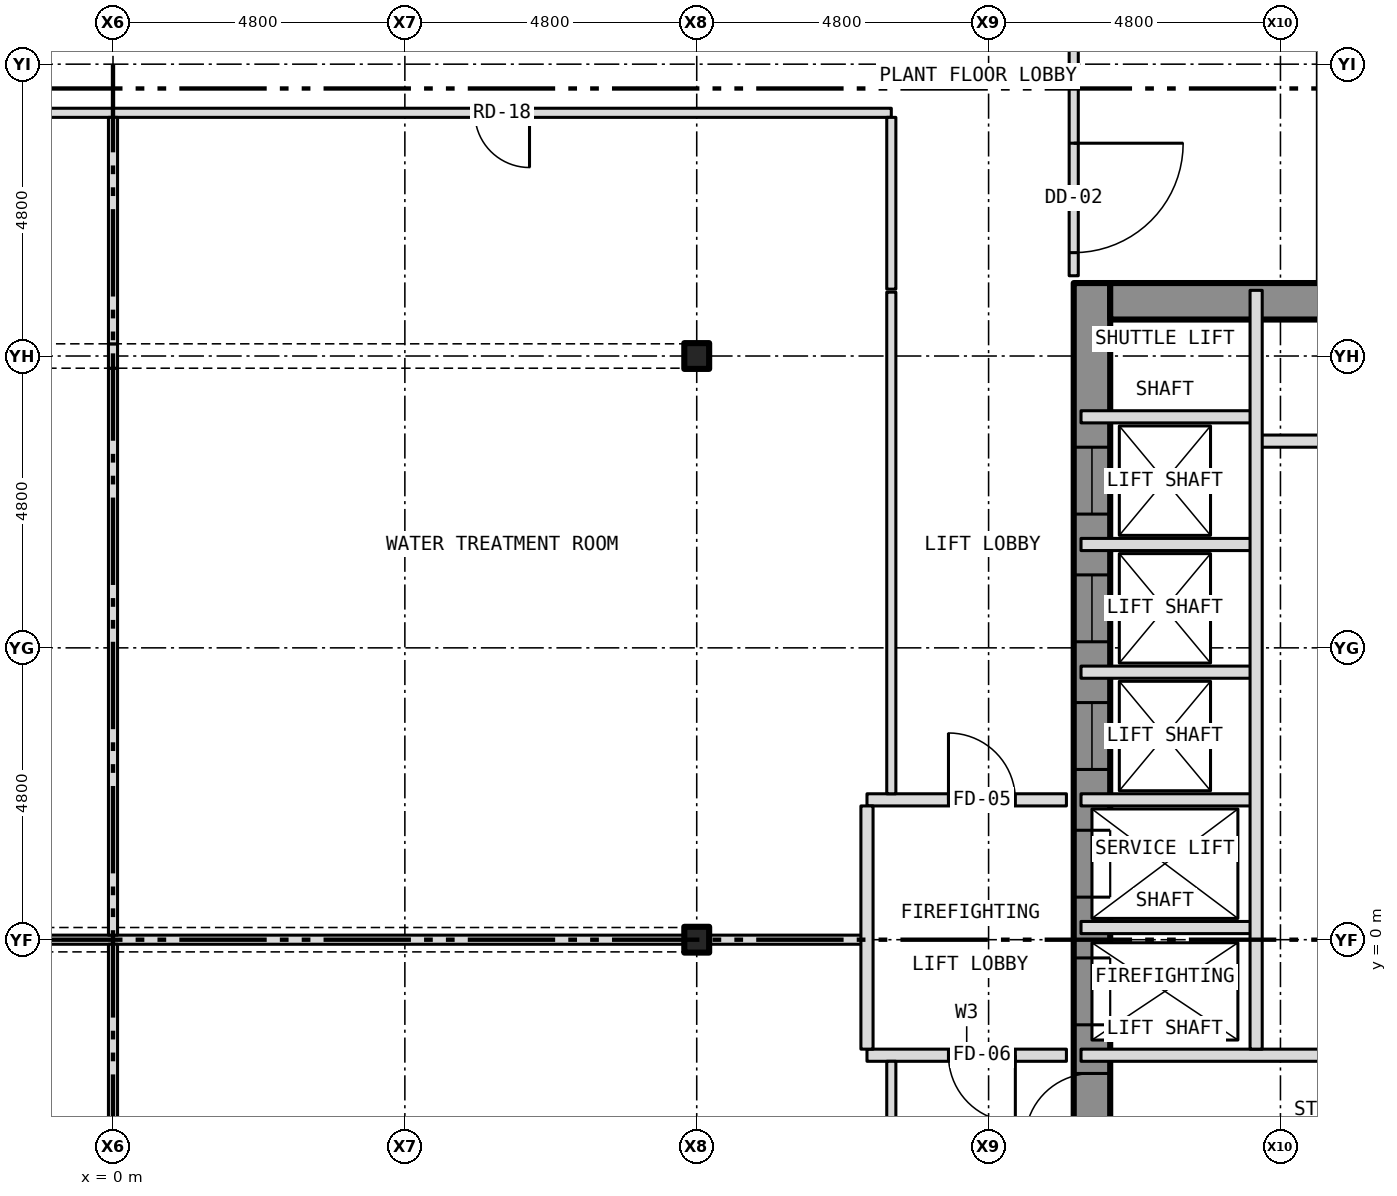
"""IFC4 building model, lengths in metres.
Left out: names, types, materials, properties, quantities, classifications, styles, units other than length and angle.
Written with IfcOpenShell. Run it as: python <this file> out.ifc"""

import sys

from ifc_helpers import new_model, si_unit, direction, frame, frame_2d, origin, origin_2d, place, context, subcontext, project, spatial, rectangle, i_section, extrude, element, fill, save


model = new_model("IFC4")
c1 = context("Model", 3, precision=1e-05, world=origin(), true_north=direction((0.0, 1.0)))
c2 = subcontext(c1, "Body", "Model", "MODEL_VIEW")
j1 = project(units=[si_unit("LENGTHUNIT", "METRE"), si_unit("PLANEANGLEUNIT", "RADIAN")], contexts=[c1])
p1 = place(None, origin())
s1 = spatial("IfcSite", under=j1, at=p1, CompositionType="ELEMENT")
p2 = place(p1, origin())
s2 = spatial("IfcBuilding", under=s1, at=p2, CompositionType="ELEMENT")
p3 = place(p2, frame((0.0, 0.0, 84.5)))
s3 = spatial("IfcBuildingStorey", under=s2, at=p3, CompositionType="ELEMENT", Elevation=84.5)
for number, where, z_axis, x_axis in (
    (1, (9.6, 0.0, -0.3), (0.0, 0.0, 1.0), (1.0, 0.0, 0.0)),
    (2, (9.6, 9.6, -0.3), (0.0, 0.0, 1.0), (1.0, 0.0, 0.0)),
):
    element("IfcColumn", number, at=place(p3, frame(where, z_axis=z_axis, x_axis=x_axis)), inside=s3, PredefinedType="COLUMN", context=c2, shape_type="SweptSolid", body=[
        extrude(i_section(OverallWidth=0.409, OverallDepth=0.424, WebThickness=0.033, FlangeThickness=0.052, at=origin_2d()), origin(), (0.0, 0.0, 1.0), 4.65),
    ])
p4 = place(p3, frame((16.1, -10.8, 0.0), z_axis=(0.0, 0.0, 1.0), x_axis=(0.0, 1.0, 0.0)))
e3 = element("IfcWall", 3, at=p4, inside=s3, PredefinedType="SHEAR", context=c2, shape_type="SweptSolid", body=[
    extrude(rectangle(XDim=21.6, YDim=0.6, at=frame_2d((10.8, 0.0))), origin(), (0.0, 0.0, 1.0), 3.9),
])
p5 = place(p4, frame((9.4, 0.0, 0.0)))
e4 = element("IfcOpeningElement", 4, at=p5, cuts=e3, PredefinedType="OPENING", context=c2, shape_type="SweptSolid", body=[
    extrude(rectangle(XDim=1.1, YDim=2.1, at=frame_2d((0.55, 1.05))), frame((0.0, 0.312, 0.0), z_axis=(0.0, -1.0, 0.0), x_axis=(1.0, 0.0, 0.0)), (0.0, 0.0, 1.0), 0.624),
])
p6 = place(p4, frame((11.5, 0.0, 0.0)))
e5 = element("IfcOpeningElement", 5, at=p6, cuts=e3, PredefinedType="OPENING", context=c2, shape_type="SweptSolid", body=[
    extrude(rectangle(XDim=1.1, YDim=2.1, at=frame_2d((0.55, 1.05))), frame((0.0, 0.312, 0.0), z_axis=(0.0, -1.0, 0.0), x_axis=(1.0, 0.0, 0.0)), (0.0, 0.0, 1.0), 0.624),
])
p7 = place(p4, frame((13.6, 0.0, 0.0)))
e6 = element("IfcOpeningElement", 6, at=p7, cuts=e3, PredefinedType="OPENING", context=c2, shape_type="SweptSolid", body=[
    extrude(rectangle(XDim=1.1, YDim=2.1, at=frame_2d((0.55, 1.05))), frame((0.0, 0.312, 0.0), z_axis=(0.0, -1.0, 0.0), x_axis=(1.0, 0.0, 0.0)), (0.0, 0.0, 1.0), 0.624),
])
p8 = place(p4, frame((15.7, 0.0, 0.0)))
e7 = element("IfcOpeningElement", 7, at=p8, cuts=e3, PredefinedType="OPENING", context=c2, shape_type="SweptSolid", body=[
    extrude(rectangle(XDim=1.1, YDim=2.1, at=frame_2d((0.55, 1.05))), frame((0.0, 0.312, 0.0), z_axis=(0.0, -1.0, 0.0), x_axis=(1.0, 0.0, 0.0)), (0.0, 0.0, 1.0), 0.624),
])
p9 = place(p4, frame((17.8, 0.0, 0.0)))
e8 = element("IfcOpeningElement", 8, at=p9, cuts=e3, PredefinedType="OPENING", context=c2, shape_type="SweptSolid", body=[
    extrude(rectangle(XDim=1.1, YDim=2.1, at=frame_2d((0.55, 1.05))), frame((0.0, 0.312, 0.0), z_axis=(0.0, -1.0, 0.0), x_axis=(1.0, 0.0, 0.0)), (0.0, 0.0, 1.0), 0.624),
])
p10 = place(p4, frame((5.642, 0.0, 0.0)))
e9 = element("IfcOpeningElement", 9, at=p10, cuts=e3, PredefinedType="OPENING", context=c2, shape_type="SweptSolid", body=[
    extrude(rectangle(XDim=1.1, YDim=2.1, at=frame_2d((0.55, 1.05))), frame((0.0, 0.312, 0.0), z_axis=(0.0, -1.0, 0.0), x_axis=(1.0, 0.0, 0.0)), (0.0, 0.0, 1.0), 0.624),
])
p11 = place(p4, frame((7.5, 0.0, 0.0)))
e10 = element("IfcOpeningElement", 10, at=p11, cuts=e3, PredefinedType="OPENING", context=c2, shape_type="SweptSolid", body=[
    extrude(rectangle(XDim=1.1, YDim=2.1, at=frame_2d((0.55, 1.05))), frame((0.0, 0.312, 0.0), z_axis=(0.0, -1.0, 0.0), x_axis=(1.0, 0.0, 0.0)), (0.0, 0.0, 1.0), 0.624),
])
p12 = place(p3, frame((16.4, 10.5, 0.0), z_axis=(0.0, 0.0, 1.0), x_axis=(1.0, 0.0, 0.0)))
e11 = element("IfcWall", 11, at=p12, inside=s3, PredefinedType="SHEAR", context=c2, shape_type="SweptSolid", body=[
    extrude(rectangle(XDim=7.0, YDim=0.6, at=frame_2d((3.5, 0.0))), origin(), (0.0, 0.0, 1.0), 3.9),
])
p13 = place(p3, frame((12.4, -1.9, 0.0), z_axis=(0.0, 0.0, 1.0), x_axis=(1.0, 0.0, 0.0)))
e12 = element("IfcWall", 12, at=p13, inside=s3, PredefinedType="PARTITIONING", context=c2, shape_type="SweptSolid", body=[
    extrude(rectangle(XDim=3.28, YDim=0.2, at=frame_2d((1.64, 0.0))), origin(), (0.0, 0.0, 1.0), 4.35),
])
p14 = place(p13, frame((1.34, 0.0, 0.0)))
e13 = element("IfcOpeningElement", 13, at=p14, cuts=e12, PredefinedType="OPENING", context=c2, shape_type="SweptSolid", body=[
    extrude(rectangle(XDim=1.1, YDim=2.1, at=frame_2d((0.55, 1.05))), frame((0.0, 0.112, 0.0), z_axis=(0.0, -1.0, 0.0), x_axis=(1.0, 0.0, 0.0)), (0.0, 0.0, 1.0), 0.224),
])
p15 = place(p3, frame((15.92, -1.9, 0.0), z_axis=(0.0, 0.0, 1.0), x_axis=(1.0, 0.0, 0.0)))
e14 = element("IfcWall", 14, at=p15, inside=s3, PredefinedType="PARTITIONING", context=c2, shape_type="SweptSolid", body=[
    extrude(rectangle(XDim=7.96, YDim=0.2, at=frame_2d((3.98, 0.0))), origin(), (0.0, 0.0, 1.0), 3.9),
])
p16 = place(p3, frame((-9.804, 0.0, 0.0), z_axis=(0.0, 0.0, 1.0), x_axis=(1.0, 0.0, 0.0)))
e15 = element("IfcWall", 15, at=p16, inside=s3, PredefinedType="PARTITIONING", context=c2, shape_type="SweptSolid", body=[
    extrude(rectangle(XDim=19.608, YDim=0.15, at=frame_2d((9.804, 0.0))), origin(), (0.0, 0.0, 1.0), 4.35),
])
p17 = place(p3, frame((9.804, 0.0, 0.0), z_axis=(0.0, 0.0, 1.0), x_axis=(1.0, 0.0, 0.0)))
e16 = element("IfcWall", 16, at=p17, inside=s3, PredefinedType="PARTITIONING", context=c2, shape_type="SweptSolid", body=[
    extrude(rectangle(XDim=2.596, YDim=0.15, at=frame_2d((1.298, 0.0))), origin(), (0.0, 0.0, 1.0), 3.728),
])
p18 = place(p3, frame((15.92, 0.2, 0.0), z_axis=(0.0, 0.0, 1.0), x_axis=(1.0, 0.0, 0.0)))
e17 = element("IfcWall", 17, at=p18, inside=s3, PredefinedType="PARTITIONING", context=c2, shape_type="SweptSolid", body=[
    extrude(rectangle(XDim=2.88, YDim=0.2, at=frame_2d((1.44, 0.0))), origin(), (0.0, 0.0, 1.0), 3.9),
])
p19 = place(p3, frame((12.4, 2.3, 0.0), z_axis=(0.0, 0.0, 1.0), x_axis=(1.0, 0.0, 0.0)))
e18 = element("IfcWall", 18, at=p19, inside=s3, PredefinedType="PARTITIONING", context=c2, shape_type="SweptSolid", body=[
    extrude(rectangle(XDim=3.28, YDim=0.2, at=frame_2d((1.64, 0.0))), origin(), (0.0, 0.0, 1.0), 4.35),
])
p20 = place(p19, frame((1.34, 0.0, 0.0)))
e19 = element("IfcOpeningElement", 19, at=p20, cuts=e18, PredefinedType="OPENING", context=c2, shape_type="SweptSolid", body=[
    extrude(rectangle(XDim=1.1, YDim=2.1, at=frame_2d((0.55, 1.05))), frame((0.0, 0.112, 0.0), z_axis=(0.0, -1.0, 0.0), x_axis=(1.0, 0.0, 0.0)), (0.0, 0.0, 1.0), 0.224),
])
for number, where, z_axis, x_axis in (
    (20, (15.92, 2.3, 0.0), (0.0, 0.0, 1.0), (1.0, 0.0, 0.0)),
    (21, (15.92, 4.4, 0.0), (0.0, 0.0, 1.0), (1.0, 0.0, 0.0)),
    (22, (15.92, 6.5, 0.0), (0.0, 0.0, 1.0), (1.0, 0.0, 0.0)),
):
    element("IfcWall", number, at=place(p3, frame(where, z_axis=z_axis, x_axis=x_axis)), inside=s3, PredefinedType="PARTITIONING", context=c2, shape_type="SweptSolid", body=[
        extrude(rectangle(XDim=2.88, YDim=0.2, at=frame_2d((1.44, 0.0))), origin(), (0.0, 0.0, 1.0), 3.9),
    ])
p21 = place(p3, frame((18.8, 8.2, 0.0), z_axis=(0.0, 0.0, 1.0), x_axis=(1.0, 0.0, 0.0)))
e23 = element("IfcWall", 23, at=p21, inside=s3, PredefinedType="PARTITIONING", context=c2, shape_type="SweptSolid", body=[
    extrude(rectangle(XDim=5.08, YDim=0.2, at=frame_2d((2.54, 0.0))), origin(), (0.0, 0.0, 1.0), 3.9),
])
p22 = place(p3, frame((15.92, 8.6, 0.0), z_axis=(0.0, 0.0, 1.0), x_axis=(1.0, 0.0, 0.0)))
e24 = element("IfcWall", 24, at=p22, inside=s3, PredefinedType="PARTITIONING", context=c2, shape_type="SweptSolid", body=[
    extrude(rectangle(XDim=2.88, YDim=0.2, at=frame_2d((1.44, 0.0))), origin(), (0.0, 0.0, 1.0), 3.9),
])
p23 = place(p3, frame((-12.8, 13.6, 0.0), z_axis=(0.0, 0.0, 1.0), x_axis=(1.0, 0.0, 0.0)))
e25 = element("IfcWall", 25, at=p23, inside=s3, PredefinedType="PARTITIONING", context=c2, shape_type="SweptSolid", body=[
    extrude(rectangle(XDim=25.6, YDim=0.15, at=frame_2d((12.8, 0.0))), origin(), (0.0, 0.0, 1.0), 4.35),
])
p24 = place(p23, frame((5.95, 0.0, 0.0)))
e26 = element("IfcOpeningElement", 26, at=p24, cuts=e25, PredefinedType="OPENING", context=c2, shape_type="SweptSolid", body=[
    extrude(rectangle(XDim=0.9, YDim=2.1, at=frame_2d((0.45, 1.05))), frame((0.0, 0.087, 0.0), z_axis=(0.0, -1.0, 0.0), x_axis=(1.0, 0.0, 0.0)), (0.0, 0.0, 1.0), 0.174),
])
p25 = place(p23, frame((18.75, 0.0, 0.0)))
e27 = element("IfcOpeningElement", 27, at=p25, cuts=e25, PredefinedType="OPENING", context=c2, shape_type="SweptSolid", body=[
    extrude(rectangle(XDim=0.9, YDim=2.1, at=frame_2d((0.45, 1.05))), frame((0.0, 0.087, 0.0), z_axis=(0.0, -1.0, 0.0), x_axis=(1.0, 0.0, 0.0)), (0.0, 0.0, 1.0), 0.174),
])
for number, where, z_axis, x_axis in (
    (28, (0.0, -9.399, 0.0), (0.0, 0.0, 1.0), (0.0, 1.0, 0.0)),
    (29, (0.0, 0.075, 0.0), (0.0, 0.0, 1.0), (0.0, 1.0, 0.0)),
):
    element("IfcWall", number, at=place(p3, frame(where, z_axis=z_axis, x_axis=x_axis)), inside=s3, PredefinedType="PARTITIONING", context=c2, shape_type="SweptSolid", body=[
        extrude(rectangle(XDim=9.324, YDim=0.15, at=frame_2d((4.662, 0.0))), origin(), (0.0, 0.0, 1.0), 3.728),
    ])
p26 = place(p3, frame((0.0, 9.399, 0.0), z_axis=(0.0, 0.0, 1.0), x_axis=(0.0, 1.0, 0.0)))
e30 = element("IfcWall", 30, at=p26, inside=s3, PredefinedType="PARTITIONING", context=c2, shape_type="SweptSolid", body=[
    extrude(rectangle(XDim=0.401, YDim=0.15, at=frame_2d((0.201, 0.0))), origin(), (0.0, 0.0, 1.0), 4.35),
])
p27 = place(p3, frame((0.0, 9.8, 0.0), z_axis=(0.0, 0.0, 1.0), x_axis=(0.0, 1.0, 0.0)))
e31 = element("IfcWall", 31, at=p27, inside=s3, PredefinedType="PARTITIONING", context=c2, shape_type="SweptSolid", body=[
    extrude(rectangle(XDim=3.725, YDim=0.15, at=frame_2d((1.862, 0.0))), origin(), (0.0, 0.0, 1.0), 3.728),
])
p28 = place(p3, frame((12.4, -1.8, 0.0), z_axis=(0.0, 0.0, 1.0), x_axis=(0.0, 1.0, 0.0)))
e32 = element("IfcWall", 32, at=p28, inside=s3, PredefinedType="PARTITIONING", context=c2, shape_type="SweptSolid", body=[
    extrude(rectangle(XDim=4.0, YDim=0.2, at=frame_2d((2.0, 0.0))), origin(), (0.0, 0.0, 1.0), 4.35),
])
p29 = place(p3, frame((12.8, -13.525, 0.0), z_axis=(0.0, 0.0, 1.0), x_axis=(0.0, 1.0, 0.0)))
e33 = element("IfcWall", 33, at=p29, inside=s3, PredefinedType="PARTITIONING", context=c2, shape_type="SweptSolid", body=[
    extrude(rectangle(XDim=11.525, YDim=0.15, at=frame_2d((5.762, 0.0))), origin(), (0.0, 0.0, 1.0), 4.35),
])
p30 = place(p3, frame((12.8, 2.4, 0.0), z_axis=(0.0, 0.0, 1.0), x_axis=(0.0, 1.0, 0.0)))
e34 = element("IfcWall", 34, at=p30, inside=s3, PredefinedType="PARTITIONING", context=c2, shape_type="SweptSolid", body=[
    extrude(rectangle(XDim=8.25, YDim=0.15, at=frame_2d((4.125, 0.0))), origin(), (0.0, 0.0, 1.0), 4.35),
])
p31 = place(p3, frame((12.8, 10.7, 0.0), z_axis=(0.0, 0.0, 1.0), x_axis=(0.0, 1.0, 0.0)))
e35 = element("IfcWall", 35, at=p31, inside=s3, PredefinedType="PARTITIONING", context=c2, shape_type="SweptSolid", body=[
    extrude(rectangle(XDim=2.825, YDim=0.15, at=frame_2d((1.413, 0.0))), origin(), (0.0, 0.0, 1.0), 4.35),
])
p32 = place(p3, frame((15.8, 10.92, 0.0), z_axis=(0.0, 0.0, 1.0), x_axis=(0.0, 1.0, 0.0)))
e36 = element("IfcWall", 36, at=p32, inside=s3, PredefinedType="PARTITIONING", context=c2, shape_type="SweptSolid", body=[
    extrude(rectangle(XDim=4.805, YDim=0.15, at=frame_2d((2.403, 0.0))), origin(), (0.0, 0.0, 1.0), 4.35),
])
p33 = place(p32, frame((0.38, 0.0, 0.0)))
e37 = element("IfcOpeningElement", 37, at=p33, cuts=e36, PredefinedType="OPENING", context=c2, shape_type="SweptSolid", body=[
    extrude(rectangle(XDim=1.8, YDim=2.1, at=frame_2d((0.9, 1.05))), frame((0.0, 0.087, 0.0), z_axis=(0.0, -1.0, 0.0), x_axis=(1.0, 0.0, 0.0)), (0.0, 0.0, 1.0), 0.174),
])
p34 = place(p3, frame((18.8, -1.8, 0.0), z_axis=(0.0, 0.0, 1.0), x_axis=(0.0, 1.0, 0.0)))
e38 = element("IfcWall", 38, at=p34, inside=s3, PredefinedType="PARTITIONING", context=c2, shape_type="SweptSolid", body=[
    extrude(rectangle(XDim=12.48, YDim=0.2, at=frame_2d((6.24, 0.0))), origin(), (0.0, 0.0, 1.0), 3.9),
])
p35 = place(p5, origin())
e39 = element("IfcDoor", 39, at=p35, inside=s3, OperationType="SLIDING_TO_LEFT", PredefinedType="DOOR", context=c2, shape_type="SweptSolid", body=[
    extrude(rectangle(XDim=1.1, YDim=2.1, at=frame_2d((0.55, 1.05))), frame((0.0, 0.025, 0.0), z_axis=(0.0, -1.0, 0.0), x_axis=(1.0, 0.0, 0.0)), (0.0, 0.0, 1.0), 0.05),
])
fill(e4, e39)
p36 = place(p6, origin())
e40 = element("IfcDoor", 40, at=p36, inside=s3, OperationType="SLIDING_TO_LEFT", PredefinedType="DOOR", context=c2, shape_type="SweptSolid", body=[
    extrude(rectangle(XDim=1.1, YDim=2.1, at=frame_2d((0.55, 1.05))), frame((0.0, 0.025, 0.0), z_axis=(0.0, -1.0, 0.0), x_axis=(1.0, 0.0, 0.0)), (0.0, 0.0, 1.0), 0.05),
])
fill(e5, e40)
p37 = place(p7, origin())
e41 = element("IfcDoor", 41, at=p37, inside=s3, OperationType="SLIDING_TO_LEFT", PredefinedType="DOOR", context=c2, shape_type="SweptSolid", body=[
    extrude(rectangle(XDim=1.1, YDim=2.1, at=frame_2d((0.55, 1.05))), frame((0.0, 0.025, 0.0), z_axis=(0.0, -1.0, 0.0), x_axis=(1.0, 0.0, 0.0)), (0.0, 0.0, 1.0), 0.05),
])
fill(e6, e41)
p38 = place(p8, origin())
e42 = element("IfcDoor", 42, at=p38, inside=s3, OperationType="SLIDING_TO_LEFT", PredefinedType="DOOR", context=c2, shape_type="SweptSolid", body=[
    extrude(rectangle(XDim=1.1, YDim=2.1, at=frame_2d((0.55, 1.05))), frame((0.0, 0.025, 0.0), z_axis=(0.0, -1.0, 0.0), x_axis=(1.0, 0.0, 0.0)), (0.0, 0.0, 1.0), 0.05),
])
fill(e7, e42)
p39 = place(p9, origin())
e43 = element("IfcDoor", 43, at=p39, inside=s3, OperationType="SLIDING_TO_LEFT", PredefinedType="DOOR", context=c2, shape_type="SweptSolid", body=[
    extrude(rectangle(XDim=1.1, YDim=2.1, at=frame_2d((0.55, 1.05))), frame((0.0, 0.025, 0.0), z_axis=(0.0, -1.0, 0.0), x_axis=(1.0, 0.0, 0.0)), (0.0, 0.0, 1.0), 0.05),
])
fill(e8, e43)
p40 = place(p11, origin())
e44 = element("IfcDoor", 44, at=p40, inside=s3, OperationType="SINGLE_SWING_LEFT", PredefinedType="DOOR", context=c2, shape_type="SweptSolid", body=[
    extrude(rectangle(XDim=1.1, YDim=2.1, at=frame_2d((0.55, 1.05))), frame((0.0, 0.025, 0.0), z_axis=(0.0, -1.0, 0.0), x_axis=(1.0, 0.0, 0.0)), (0.0, 0.0, 1.0), 0.05),
])
fill(e10, e44)
p41 = place(p20, origin())
e45 = element("IfcDoor", 45, at=p41, inside=s3, OperationType="SINGLE_SWING_LEFT", PredefinedType="DOOR", context=c2, shape_type="SweptSolid", body=[
    extrude(rectangle(XDim=1.1, YDim=2.1, at=frame_2d((0.55, 1.05))), frame((0.0, 0.025, 0.0), z_axis=(0.0, -1.0, 0.0), x_axis=(1.0, 0.0, 0.0)), (0.0, 0.0, 1.0), 0.05),
])
fill(e19, e45)
p42 = place(p14, origin())
e46 = element("IfcDoor", 46, at=p42, inside=s3, OperationType="SINGLE_SWING_RIGHT", PredefinedType="DOOR", context=c2, shape_type="SweptSolid", body=[
    extrude(rectangle(XDim=1.1, YDim=2.1, at=frame_2d((0.55, 1.05))), frame((0.0, 0.025, 0.0), z_axis=(0.0, -1.0, 0.0), x_axis=(1.0, 0.0, 0.0)), (0.0, 0.0, 1.0), 0.05),
])
fill(e13, e46)
p43 = place(p33, origin())
e47 = element("IfcDoor", 47, at=p43, inside=s3, OperationType="DOUBLE_DOOR_SINGLE_SWING", PredefinedType="DOOR", context=c2, shape_type="SweptSolid", body=[
    extrude(rectangle(XDim=1.8, YDim=2.1, at=frame_2d((0.9, 1.05))), frame((0.0, 0.025, 0.0), z_axis=(0.0, -1.0, 0.0), x_axis=(1.0, 0.0, 0.0)), (0.0, 0.0, 1.0), 0.05),
])
fill(e37, e47)
p44 = place(p25, origin())
e48 = element("IfcDoor", 48, at=p44, inside=s3, OperationType="SINGLE_SWING_RIGHT", PredefinedType="DOOR", context=c2, shape_type="SweptSolid", body=[
    extrude(rectangle(XDim=0.9, YDim=2.1, at=frame_2d((0.45, 1.05))), frame((0.0, 0.025, 0.0), z_axis=(0.0, -1.0, 0.0), x_axis=(1.0, 0.0, 0.0)), (0.0, 0.0, 1.0), 0.05),
])
fill(e27, e48)
save(model, sys.argv[1])
